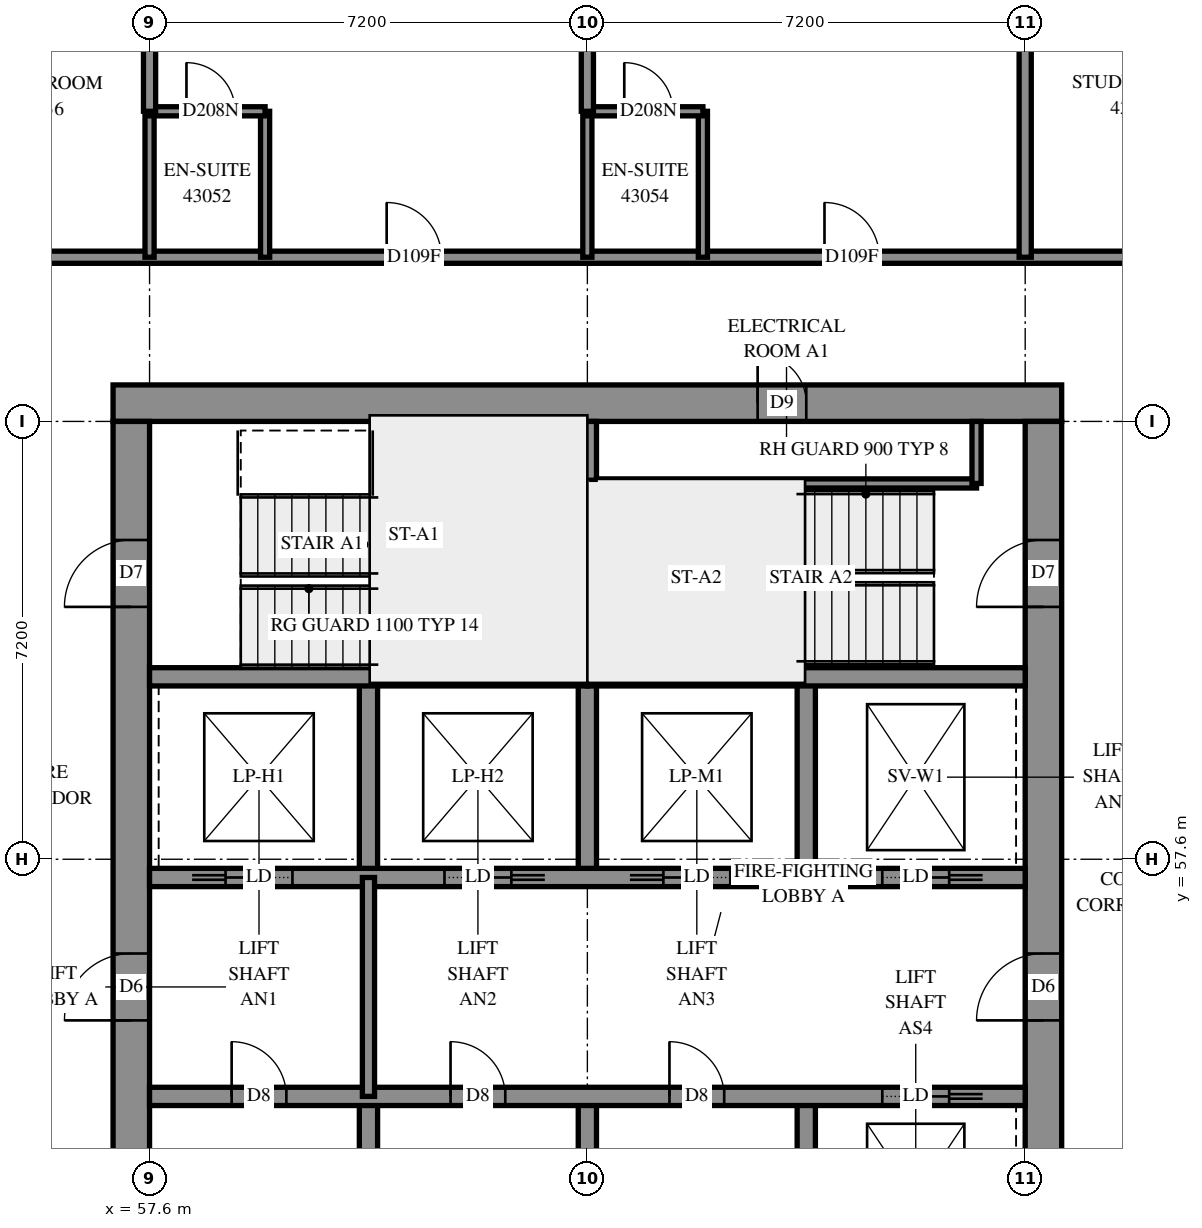
"""IFC4 building model, lengths in metres.
Left out: names, types, materials, properties, quantities, classifications, styles, units other than length and angle.
Written with IfcOpenShell. Run it as: python <this file> out.ifc"""

import sys

from ifc_helpers import new_model, si_unit, direction, frame, frame_2d, origin, place, context, subcontext, project, spatial, rectangle, extrude, element, fill, save


model = new_model("IFC4")
c1 = context("Model", 3, precision=1e-05, world=origin(), true_north=direction((0.0, 1.0)))
c2 = subcontext(c1, "Body", "Model", "MODEL_VIEW")
j1 = project(units=[si_unit("LENGTHUNIT", "METRE"), si_unit("PLANEANGLEUNIT", "RADIAN")], contexts=[c1])
p1 = place(None, origin())
s1 = spatial("IfcSite", under=j1, at=p1, CompositionType="ELEMENT")
p2 = place(p1, origin())
s2 = spatial("IfcBuilding", under=s1, at=p2, CompositionType="ELEMENT")
p3 = place(p2, frame((0.0, 0.0, 159.2)))
s3 = spatial("IfcBuildingStorey", under=s2, at=p3, CompositionType="ELEMENT", Elevation=159.2)
p4 = place(p3, frame((57.0, 65.1, -0.3), z_axis=(0.0, 0.0, 1.0), x_axis=(1.0, 0.0, 0.0)))
e1 = element("IfcWall", 1, at=p4, inside=s3, PredefinedType="SHEAR", context=c2, shape_type="SweptSolid", body=[
    extrude(rectangle(XDim=15.6, YDim=0.6, at=frame_2d((7.8, 0.0))), origin(), (0.0, 0.0, 1.0), 2.7),
])
p5 = place(p4, frame((10.6, 0.0, 0.3)))
e2 = element("IfcOpeningElement", 2, at=p5, cuts=e1, PredefinedType="OPENING", context=c2, shape_type="SweptSolid", body=[
    extrude(rectangle(XDim=0.8, YDim=2.1, at=frame_2d((0.4, 1.05))), frame((0.0, 0.31, 0.0), z_axis=(0.0, -1.0, 0.0), x_axis=(1.0, 0.0, 0.0)), (0.0, 0.0, 1.0), 0.62),
])
p6 = place(p3, frame((57.3, 50.4, -0.3), z_axis=(0.0, 0.0, 1.0), x_axis=(0.0, 1.0, 0.0)))
e3 = element("IfcWall", 3, at=p6, inside=s3, PredefinedType="SHEAR", context=c2, shape_type="SweptSolid", body=[
    extrude(rectangle(XDim=14.4, YDim=0.6, at=frame_2d((7.2, 0.0))), origin(), (0.0, 0.0, 1.0), 2.7),
])
p7 = place(p6, frame((4.55, 0.0, 0.3)))
e4 = element("IfcOpeningElement", 4, at=p7, cuts=e3, PredefinedType="OPENING", context=c2, shape_type="SweptSolid", body=[
    extrude(rectangle(XDim=1.1, YDim=2.1, at=frame_2d((0.55, 1.05))), frame((0.0, 0.31, 0.0), z_axis=(0.0, -1.0, 0.0), x_axis=(1.0, 0.0, 0.0)), (0.0, 0.0, 1.0), 0.62),
])
p8 = place(p6, frame((11.35, 0.0, 0.3)))
e5 = element("IfcOpeningElement", 5, at=p8, cuts=e3, PredefinedType="OPENING", context=c2, shape_type="SweptSolid", body=[
    extrude(rectangle(XDim=1.1, YDim=2.1, at=frame_2d((0.55, 1.05))), frame((0.0, 0.31, 0.0), z_axis=(0.0, -1.0, 0.0), x_axis=(1.0, 0.0, 0.0)), (0.0, 0.0, 1.0), 0.62),
])
p9 = place(p3, frame((72.3, 50.4, -0.3), z_axis=(0.0, 0.0, 1.0), x_axis=(0.0, 1.0, 0.0)))
e6 = element("IfcWall", 6, at=p9, inside=s3, PredefinedType="SHEAR", context=c2, shape_type="SweptSolid", body=[
    extrude(rectangle(XDim=14.4, YDim=0.6, at=frame_2d((7.2, 0.0))), origin(), (0.0, 0.0, 1.0), 2.7),
])
p10 = place(p9, frame((4.55, 0.0, 0.3)))
e7 = element("IfcOpeningElement", 7, at=p10, cuts=e6, PredefinedType="OPENING", context=c2, shape_type="SweptSolid", body=[
    extrude(rectangle(XDim=1.1, YDim=2.1, at=frame_2d((0.55, 1.05))), frame((0.0, 0.31, 0.0), z_axis=(0.0, -1.0, 0.0), x_axis=(1.0, 0.0, 0.0)), (0.0, 0.0, 1.0), 0.62),
])
p11 = place(p9, frame((11.35, 0.0, 0.3)))
e8 = element("IfcOpeningElement", 8, at=p11, cuts=e6, PredefinedType="OPENING", context=c2, shape_type="SweptSolid", body=[
    extrude(rectangle(XDim=1.1, YDim=2.1, at=frame_2d((0.55, 1.05))), frame((0.0, 0.31, 0.0), z_axis=(0.0, -1.0, 0.0), x_axis=(1.0, 0.0, 0.0)), (0.0, 0.0, 1.0), 0.62),
])
for number, where, z_axis, x_axis in (
    (9, (61.2, 50.4, 0.0), (0.0, 0.0, 1.0), (0.0, 1.0, 0.0)),
    (10, (61.2, 57.3, 0.0), (0.0, 0.0, 1.0), (0.0, 1.0, 0.0)),
    (11, (64.8, 50.4, 0.0), (0.0, 0.0, 1.0), (0.0, 1.0, 0.0)),
    (12, (64.8, 57.3, 0.0), (0.0, 0.0, 1.0), (0.0, 1.0, 0.0)),
    (13, (68.4, 50.4, 0.0), (0.0, 0.0, 1.0), (0.0, 1.0, 0.0)),
    (14, (68.4, 57.3, 0.0), (0.0, 0.0, 1.0), (0.0, 1.0, 0.0)),
):
    element("IfcWall", number, at=place(p3, frame(where, z_axis=z_axis, x_axis=x_axis)), inside=s3, PredefinedType="SOLIDWALL", context=c2, shape_type="SweptSolid", body=[
        extrude(rectangle(XDim=3.3, YDim=0.3, at=frame_2d((1.65, 0.0))), origin(), (0.0, 0.0, 1.0), 3.1),
    ])
p12 = place(p3, frame((57.6, 53.7, 0.0), z_axis=(0.0, 0.0, 1.0), x_axis=(1.0, 0.0, 0.0)))
e15 = element("IfcWall", 15, at=p12, inside=s3, PredefinedType="SOLIDWALL", context=c2, shape_type="SweptSolid", body=[
    extrude(rectangle(XDim=14.4, YDim=0.3, at=frame_2d((7.2, 0.0))), origin(), (0.0, 0.0, 1.0), 3.1),
])
p13 = place(p12, frame((1.35, 0.0, 0.0)))
e16 = element("IfcOpeningElement", 16, at=p13, cuts=e15, PredefinedType="OPENING", context=c2, shape_type="SweptSolid", body=[
    extrude(rectangle(XDim=0.9, YDim=2.1, at=frame_2d((0.45, 1.05))), frame((0.0, 0.16, 0.0), z_axis=(0.0, -1.0, 0.0), x_axis=(1.0, 0.0, 0.0)), (0.0, 0.0, 1.0), 0.32),
])
p14 = place(p12, frame((4.95, 0.0, 0.0)))
e17 = element("IfcOpeningElement", 17, at=p14, cuts=e15, PredefinedType="OPENING", context=c2, shape_type="SweptSolid", body=[
    extrude(rectangle(XDim=0.9, YDim=2.1, at=frame_2d((0.45, 1.05))), frame((0.0, 0.16, 0.0), z_axis=(0.0, -1.0, 0.0), x_axis=(1.0, 0.0, 0.0)), (0.0, 0.0, 1.0), 0.32),
])
p15 = place(p12, frame((8.55, 0.0, 0.0)))
e18 = element("IfcOpeningElement", 18, at=p15, cuts=e15, PredefinedType="OPENING", context=c2, shape_type="SweptSolid", body=[
    extrude(rectangle(XDim=0.9, YDim=2.1, at=frame_2d((0.45, 1.05))), frame((0.0, 0.16, 0.0), z_axis=(0.0, -1.0, 0.0), x_axis=(1.0, 0.0, 0.0)), (0.0, 0.0, 1.0), 0.32),
])
p16 = place(p12, frame((12.05, 0.0, 0.0)))
e19 = element("IfcOpeningElement", 19, at=p16, cuts=e15, PredefinedType="OPENING", context=c2, shape_type="SweptSolid", body=[
    extrude(rectangle(XDim=1.1, YDim=2.1, at=frame_2d((0.55, 1.05))), frame((0.0, 0.16, 0.0), z_axis=(0.0, -1.0, 0.0), x_axis=(1.0, 0.0, 0.0)), (0.0, 0.0, 1.0), 0.32),
])
p17 = place(p3, frame((57.6, 57.3, 0.0), z_axis=(0.0, 0.0, 1.0), x_axis=(1.0, 0.0, 0.0)))
e20 = element("IfcWall", 20, at=p17, inside=s3, PredefinedType="SOLIDWALL", context=c2, shape_type="SweptSolid", body=[
    extrude(rectangle(XDim=14.4, YDim=0.3, at=frame_2d((7.2, 0.0))), origin(), (0.0, 0.0, 1.0), 3.1),
])
p18 = place(p17, frame((1.25, 0.0, 0.0)))
e21 = element("IfcOpeningElement", 21, at=p18, cuts=e20, PredefinedType="OPENING", context=c2, shape_type="SweptSolid", body=[
    extrude(rectangle(XDim=1.1, YDim=2.1, at=frame_2d((0.55, 1.05))), frame((0.0, 0.16, 0.0), z_axis=(0.0, -1.0, 0.0), x_axis=(1.0, 0.0, 0.0)), (0.0, 0.0, 1.0), 0.32),
])
p19 = place(p17, frame((4.85, 0.0, 0.0)))
e22 = element("IfcOpeningElement", 22, at=p19, cuts=e20, PredefinedType="OPENING", context=c2, shape_type="SweptSolid", body=[
    extrude(rectangle(XDim=1.1, YDim=2.1, at=frame_2d((0.55, 1.05))), frame((0.0, 0.16, 0.0), z_axis=(0.0, -1.0, 0.0), x_axis=(1.0, 0.0, 0.0)), (0.0, 0.0, 1.0), 0.32),
])
p20 = place(p17, frame((8.45, 0.0, 0.0)))
e23 = element("IfcOpeningElement", 23, at=p20, cuts=e20, PredefinedType="OPENING", context=c2, shape_type="SweptSolid", body=[
    extrude(rectangle(XDim=1.1, YDim=2.1, at=frame_2d((0.55, 1.05))), frame((0.0, 0.16, 0.0), z_axis=(0.0, -1.0, 0.0), x_axis=(1.0, 0.0, 0.0)), (0.0, 0.0, 1.0), 0.32),
])
p21 = place(p17, frame((12.05, 0.0, 0.0)))
e24 = element("IfcOpeningElement", 24, at=p21, cuts=e20, PredefinedType="OPENING", context=c2, shape_type="SweptSolid", body=[
    extrude(rectangle(XDim=1.1, YDim=2.1, at=frame_2d((0.55, 1.05))), frame((0.0, 0.16, 0.0), z_axis=(0.0, -1.0, 0.0), x_axis=(1.0, 0.0, 0.0)), (0.0, 0.0, 1.0), 0.32),
])
for number, where, z_axis, x_axis in (
    (25, (57.6, 60.6, 0.0), (0.0, 0.0, 1.0), (1.0, 0.0, 0.0)),
    (26, (64.8, 60.6, 0.0), (0.0, 0.0, 1.0), (1.0, 0.0, 0.0)),
):
    element("IfcWall", number, at=place(p3, frame(where, z_axis=z_axis, x_axis=x_axis)), inside=s3, PredefinedType="SOLIDWALL", context=c2, shape_type="SweptSolid", body=[
        extrude(rectangle(XDim=7.2, YDim=0.3, at=frame_2d((3.6, 0.0))), origin(), (0.0, 0.0, 1.0), 3.1),
    ])
p22 = place(p3, frame((64.8, 60.6, 0.0), z_axis=(0.0, 0.0, 1.0), x_axis=(0.0, 1.0, 0.0)))
e27 = element("IfcWall", 27, at=p22, inside=s3, PredefinedType="SOLIDWALL", context=c2, shape_type="SweptSolid", body=[
    extrude(rectangle(XDim=4.2, YDim=0.3, at=frame_2d((2.1, 0.0))), origin(), (0.0, 0.0, 1.0), 3.1),
])
p23 = place(p3, frame((64.95, 63.78, 0.0), z_axis=(0.0, 0.0, 1.0), x_axis=(1.0, 0.0, 0.0)))
e28 = element("IfcWall", 28, at=p23, inside=s3, PredefinedType="PARTITIONING", context=c2, shape_type="SweptSolid", body=[
    extrude(rectangle(XDim=6.25, YDim=0.15, at=frame_2d((3.125, 0.0))), origin(), (0.0, 0.0, 1.0), 3.1),
])
p24 = place(p3, frame((71.2, 63.78, 0.0), z_axis=(0.0, 0.0, 1.0), x_axis=(0.0, 1.0, 0.0)))
e29 = element("IfcWall", 29, at=p24, inside=s3, PredefinedType="PARTITIONING", context=c2, shape_type="SweptSolid", body=[
    extrude(rectangle(XDim=1.02, YDim=0.15, at=frame_2d((0.51, 0.0))), origin(), (0.0, 0.0, 1.0), 3.1),
])
p25 = place(p3, frame((61.2, 53.7, 0.0), z_axis=(0.0, 0.0, 1.0), x_axis=(0.0, 1.0, 0.0)))
e30 = element("IfcWall", 30, at=p25, inside=s3, PredefinedType="PARTITIONING", context=c2, shape_type="SweptSolid", body=[
    extrude(rectangle(XDim=3.6, YDim=0.2, at=frame_2d((1.8, 0.0))), origin(), (0.0, 0.0, 1.0), 3.1),
])
p26 = place(p3, frame((54.9, 67.5, 0.0), z_axis=(0.0, 0.0, 1.0), x_axis=(1.0, 0.0, 0.0)))
e31 = element("IfcWall", 31, at=p26, inside=s3, PredefinedType="PARTITIONING", context=c2, shape_type="SweptSolid", body=[
    extrude(rectangle(XDim=19.8, YDim=0.2, at=frame_2d((9.9, 0.0))), origin(), (0.0, 0.0, 1.0), 3.1),
])
p27 = place(p26, frame((6.599, 0.0, 0.0)))
e32 = element("IfcOpeningElement", 32, at=p27, cuts=e31, PredefinedType="OPENING", context=c2, shape_type="SweptSolid", body=[
    extrude(rectangle(XDim=0.9, YDim=2.1, at=frame_2d((0.45, 1.05))), frame((0.0, 0.11, 0.0), z_axis=(0.0, -1.0, 0.0), x_axis=(1.0, 0.0, 0.0)), (0.0, 0.0, 1.0), 0.22),
])
p28 = place(p26, frame((13.799, 0.0, 0.0)))
e33 = element("IfcOpeningElement", 33, at=p28, cuts=e31, PredefinedType="OPENING", context=c2, shape_type="SweptSolid", body=[
    extrude(rectangle(XDim=0.9, YDim=2.1, at=frame_2d((0.45, 1.05))), frame((0.0, 0.11, 0.0), z_axis=(0.0, -1.0, 0.0), x_axis=(1.0, 0.0, 0.0)), (0.0, 0.0, 1.0), 0.22),
])
p29 = place(p3, frame((72.0, 67.5, 0.0), z_axis=(0.0, 0.0, 1.0), x_axis=(0.0, 1.0, 0.0)))
e34 = element("IfcWall", 34, at=p29, inside=s3, PredefinedType="PARTITIONING", context=c2, shape_type="SweptSolid", body=[
    extrude(rectangle(XDim=4.05, YDim=0.2, at=frame_2d((2.025, 0.0))), origin(), (0.0, 0.0, 1.0), 3.1),
])
for number, where, z_axis, x_axis in (
    (35, (59.5, 67.5, 0.0), (0.0, 0.0, 1.0), (0.0, 1.0, 0.0)),
    (36, (57.6, 67.5, 0.0), (0.0, 0.0, 1.0), (0.0, 1.0, 0.0)),
    (37, (66.7, 67.5, 0.0), (0.0, 0.0, 1.0), (0.0, 1.0, 0.0)),
    (38, (64.8, 67.5, 0.0), (0.0, 0.0, 1.0), (0.0, 1.0, 0.0)),
):
    element("IfcWall", number, at=place(p3, frame(where, z_axis=z_axis, x_axis=x_axis)), inside=s3, PredefinedType="PARTITIONING", context=c2, shape_type="SweptSolid", body=[
        extrude(rectangle(XDim=2.4, YDim=0.15, at=frame_2d((1.2, 0.0))), origin(), (0.0, 0.0, 1.0), 3.1),
    ])
p30 = place(p3, frame((64.8, 69.9, 0.0), z_axis=(0.0, 0.0, 1.0), x_axis=(1.0, 0.0, 0.0)))
e39 = element("IfcWall", 39, at=p30, inside=s3, PredefinedType="PARTITIONING", context=c2, shape_type="SweptSolid", body=[
    extrude(rectangle(XDim=1.9, YDim=0.15, at=frame_2d((0.95, 0.0))), origin(), (0.0, 0.0, 1.0), 3.1),
])
p31 = place(p30, frame((0.607, 0.0, 0.0)))
e40 = element("IfcOpeningElement", 40, at=p31, cuts=e39, PredefinedType="OPENING", context=c2, shape_type="SweptSolid", body=[
    extrude(rectangle(XDim=0.8, YDim=2.1, at=frame_2d((0.4, 1.05))), frame((0.0, 0.085, 0.0), z_axis=(0.0, -1.0, 0.0), x_axis=(1.0, 0.0, 0.0)), (0.0, 0.0, 1.0), 0.17),
])
p32 = place(p3, frame((57.6, 69.9, 0.0), z_axis=(0.0, 0.0, 1.0), x_axis=(1.0, 0.0, 0.0)))
e41 = element("IfcWall", 41, at=p32, inside=s3, PredefinedType="PARTITIONING", context=c2, shape_type="SweptSolid", body=[
    extrude(rectangle(XDim=1.9, YDim=0.15, at=frame_2d((0.95, 0.0))), origin(), (0.0, 0.0, 1.0), 3.1),
])
p33 = place(p32, frame((0.607, 0.0, 0.0)))
e42 = element("IfcOpeningElement", 42, at=p33, cuts=e41, PredefinedType="OPENING", context=c2, shape_type="SweptSolid", body=[
    extrude(rectangle(XDim=0.8, YDim=2.1, at=frame_2d((0.4, 1.05))), frame((0.0, 0.085, 0.0), z_axis=(0.0, -1.0, 0.0), x_axis=(1.0, 0.0, 0.0)), (0.0, 0.0, 1.0), 0.17),
])
for number, where, z_axis, x_axis in (
    (43, (57.6, 69.9, 0.0), (0.0, 0.0, 1.0), (0.0, 1.0, 0.0)),
    (44, (64.8, 69.9, 0.0), (0.0, 0.0, 1.0), (0.0, 1.0, 0.0)),
):
    element("IfcWall", number, at=place(p3, frame(where, z_axis=z_axis, x_axis=x_axis)), inside=s3, PredefinedType="PARTITIONING", context=c2, shape_type="SweptSolid", body=[
        extrude(rectangle(XDim=1.65, YDim=0.2, at=frame_2d((0.825, 0.0))), origin(), (0.0, 0.0, 1.0), 3.1),
    ])
p34 = place(p5, origin())
e45 = element("IfcDoor", 45, at=p34, inside=s3, OperationType="SINGLE_SWING_RIGHT", PredefinedType="DOOR", context=c2, shape_type="SweptSolid", body=[
    extrude(rectangle(XDim=0.8, YDim=2.1, at=frame_2d((0.4, 1.05))), frame((0.0, 0.025, 0.0), z_axis=(0.0, -1.0, 0.0), x_axis=(1.0, 0.0, 0.0)), (0.0, 0.0, 1.0), 0.05),
])
fill(e2, e45)
p35 = place(p7, origin())
e46 = element("IfcDoor", 46, at=p35, inside=s3, OperationType="DOUBLE_DOOR_SINGLE_SWING", PredefinedType="DOOR", context=c2, shape_type="SweptSolid", body=[
    extrude(rectangle(XDim=1.1, YDim=2.1, at=frame_2d((0.55, 1.05))), frame((0.0, 0.025, 0.0), z_axis=(0.0, -1.0, 0.0), x_axis=(1.0, 0.0, 0.0)), (0.0, 0.0, 1.0), 0.05),
])
fill(e4, e46)
p36 = place(p10, origin())
e47 = element("IfcDoor", 47, at=p36, inside=s3, OperationType="DOUBLE_DOOR_SINGLE_SWING", PredefinedType="DOOR", context=c2, shape_type="SweptSolid", body=[
    extrude(rectangle(XDim=1.1, YDim=2.1, at=frame_2d((0.55, 1.05))), frame((0.0, 0.025, 0.0), z_axis=(0.0, -1.0, 0.0), x_axis=(1.0, 0.0, 0.0)), (0.0, 0.0, 1.0), 0.05),
])
fill(e7, e47)
p37 = place(p8, origin())
e48 = element("IfcDoor", 48, at=p37, inside=s3, OperationType="SINGLE_SWING_LEFT", PredefinedType="DOOR", context=c2, shape_type="SweptSolid", body=[
    extrude(rectangle(XDim=1.1, YDim=2.1, at=frame_2d((0.55, 1.05))), frame((0.0, 0.025, 0.0), z_axis=(0.0, -1.0, 0.0), x_axis=(1.0, 0.0, 0.0)), (0.0, 0.0, 1.0), 0.05),
])
fill(e5, e48)
p38 = place(p11, origin())
e49 = element("IfcDoor", 49, at=p38, inside=s3, OperationType="SINGLE_SWING_RIGHT", PredefinedType="DOOR", context=c2, shape_type="SweptSolid", body=[
    extrude(rectangle(XDim=1.1, YDim=2.1, at=frame_2d((0.55, 1.05))), frame((0.0, 0.025, 0.0), z_axis=(0.0, -1.0, 0.0), x_axis=(1.0, 0.0, 0.0)), (0.0, 0.0, 1.0), 0.05),
])
fill(e8, e49)
p39 = place(p13, origin())
e50 = element("IfcDoor", 50, at=p39, inside=s3, OperationType="SINGLE_SWING_LEFT", PredefinedType="DOOR", context=c2, shape_type="SweptSolid", body=[
    extrude(rectangle(XDim=0.9, YDim=2.1, at=frame_2d((0.45, 1.05))), frame((0.0, 0.025, 0.0), z_axis=(0.0, -1.0, 0.0), x_axis=(1.0, 0.0, 0.0)), (0.0, 0.0, 1.0), 0.05),
])
fill(e16, e50)
p40 = place(p14, origin())
e51 = element("IfcDoor", 51, at=p40, inside=s3, OperationType="SINGLE_SWING_LEFT", PredefinedType="DOOR", context=c2, shape_type="SweptSolid", body=[
    extrude(rectangle(XDim=0.9, YDim=2.1, at=frame_2d((0.45, 1.05))), frame((0.0, 0.025, 0.0), z_axis=(0.0, -1.0, 0.0), x_axis=(1.0, 0.0, 0.0)), (0.0, 0.0, 1.0), 0.05),
])
fill(e17, e51)
p41 = place(p15, origin())
e52 = element("IfcDoor", 52, at=p41, inside=s3, OperationType="SINGLE_SWING_LEFT", PredefinedType="DOOR", context=c2, shape_type="SweptSolid", body=[
    extrude(rectangle(XDim=0.9, YDim=2.1, at=frame_2d((0.45, 1.05))), frame((0.0, 0.025, 0.0), z_axis=(0.0, -1.0, 0.0), x_axis=(1.0, 0.0, 0.0)), (0.0, 0.0, 1.0), 0.05),
])
fill(e18, e52)
p42 = place(p16, origin())
e53 = element("IfcDoor", 53, at=p42, inside=s3, OperationType="SLIDING_TO_RIGHT", PredefinedType="DOOR", context=c2, shape_type="SweptSolid", body=[
    extrude(rectangle(XDim=1.1, YDim=2.1, at=frame_2d((0.55, 1.05))), frame((0.0, 0.025, 0.0), z_axis=(0.0, -1.0, 0.0), x_axis=(1.0, 0.0, 0.0)), (0.0, 0.0, 1.0), 0.05),
])
fill(e19, e53)
p43 = place(p18, origin())
e54 = element("IfcDoor", 54, at=p43, inside=s3, OperationType="SLIDING_TO_LEFT", PredefinedType="DOOR", context=c2, shape_type="SweptSolid", body=[
    extrude(rectangle(XDim=1.1, YDim=2.1, at=frame_2d((0.55, 1.05))), frame((0.0, 0.025, 0.0), z_axis=(0.0, -1.0, 0.0), x_axis=(1.0, 0.0, 0.0)), (0.0, 0.0, 1.0), 0.05),
])
fill(e21, e54)
p44 = place(p19, origin())
e55 = element("IfcDoor", 55, at=p44, inside=s3, OperationType="SLIDING_TO_RIGHT", PredefinedType="DOOR", context=c2, shape_type="SweptSolid", body=[
    extrude(rectangle(XDim=1.1, YDim=2.1, at=frame_2d((0.55, 1.05))), frame((0.0, 0.025, 0.0), z_axis=(0.0, -1.0, 0.0), x_axis=(1.0, 0.0, 0.0)), (0.0, 0.0, 1.0), 0.05),
])
fill(e22, e55)
p45 = place(p20, origin())
e56 = element("IfcDoor", 56, at=p45, inside=s3, OperationType="SLIDING_TO_LEFT", PredefinedType="DOOR", context=c2, shape_type="SweptSolid", body=[
    extrude(rectangle(XDim=1.1, YDim=2.1, at=frame_2d((0.55, 1.05))), frame((0.0, 0.025, 0.0), z_axis=(0.0, -1.0, 0.0), x_axis=(1.0, 0.0, 0.0)), (0.0, 0.0, 1.0), 0.05),
])
fill(e23, e56)
p46 = place(p21, origin())
e57 = element("IfcDoor", 57, at=p46, inside=s3, OperationType="SLIDING_TO_RIGHT", PredefinedType="DOOR", context=c2, shape_type="SweptSolid", body=[
    extrude(rectangle(XDim=1.1, YDim=2.1, at=frame_2d((0.55, 1.05))), frame((0.0, 0.025, 0.0), z_axis=(0.0, -1.0, 0.0), x_axis=(1.0, 0.0, 0.0)), (0.0, 0.0, 1.0), 0.05),
])
fill(e24, e57)
p47 = place(p27, origin())
e58 = element("IfcDoor", 58, at=p47, inside=s3, OperationType="SINGLE_SWING_RIGHT", PredefinedType="DOOR", context=c2, shape_type="SweptSolid", body=[
    extrude(rectangle(XDim=0.9, YDim=2.1, at=frame_2d((0.45, 1.05))), frame((0.0, 0.025, 0.0), z_axis=(0.0, -1.0, 0.0), x_axis=(1.0, 0.0, 0.0)), (0.0, 0.0, 1.0), 0.05),
])
fill(e32, e58)
p48 = place(p33, origin())
e59 = element("IfcDoor", 59, at=p48, inside=s3, OperationType="SINGLE_SWING_RIGHT", PredefinedType="DOOR", context=c2, shape_type="SweptSolid", body=[
    extrude(rectangle(XDim=0.8, YDim=2.1, at=frame_2d((0.4, 1.05))), frame((0.0, 0.025, 0.0), z_axis=(0.0, -1.0, 0.0), x_axis=(1.0, 0.0, 0.0)), (0.0, 0.0, 1.0), 0.05),
])
fill(e42, e59)
p49 = place(p28, origin())
e60 = element("IfcDoor", 60, at=p49, inside=s3, OperationType="SINGLE_SWING_RIGHT", PredefinedType="DOOR", context=c2, shape_type="SweptSolid", body=[
    extrude(rectangle(XDim=0.9, YDim=2.1, at=frame_2d((0.45, 1.05))), frame((0.0, 0.025, 0.0), z_axis=(0.0, -1.0, 0.0), x_axis=(1.0, 0.0, 0.0)), (0.0, 0.0, 1.0), 0.05),
])
fill(e33, e60)
p50 = place(p31, origin())
e61 = element("IfcDoor", 61, at=p50, inside=s3, OperationType="SINGLE_SWING_RIGHT", PredefinedType="DOOR", context=c2, shape_type="SweptSolid", body=[
    extrude(rectangle(XDim=0.8, YDim=2.1, at=frame_2d((0.4, 1.05))), frame((0.0, 0.025, 0.0), z_axis=(0.0, -1.0, 0.0), x_axis=(1.0, 0.0, 0.0)), (0.0, 0.0, 1.0), 0.05),
])
fill(e40, e61)
save(model, sys.argv[1])
